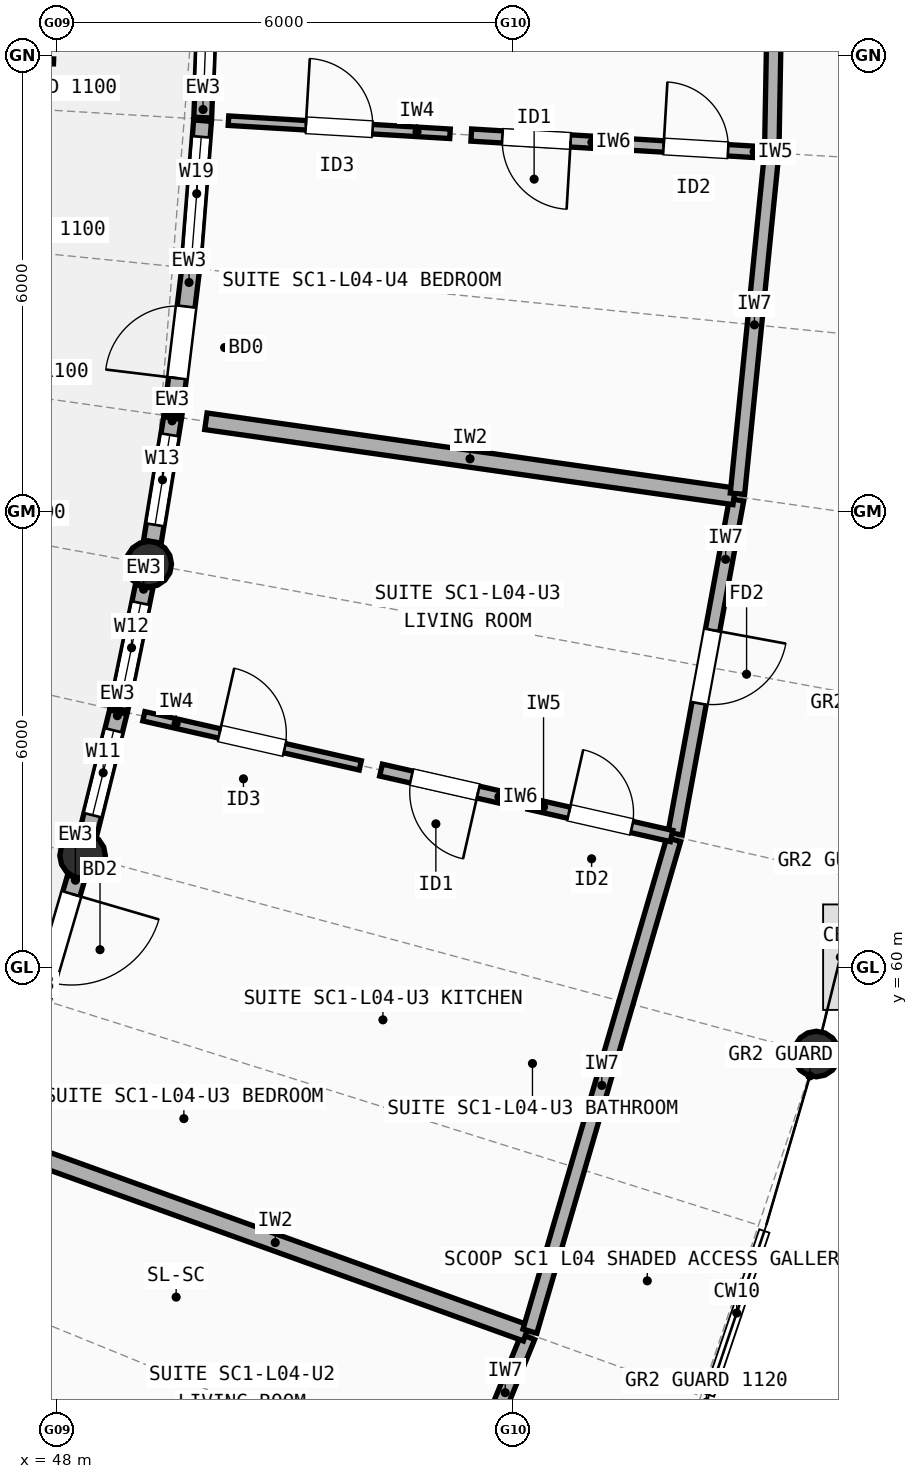
"""IFC4 building model, lengths in metres.
Left out: names, types, materials, properties, quantities, classifications, styles, units other than length and angle.
Written with IfcOpenShell. Run it as: python <this file> out.ifc"""

import sys

from ifc_helpers import new_model, si_unit, direction, frame, frame_2d, origin, origin_2d, place, context, subcontext, project, spatial, rectangle, circle, extrude, element, fill, save


model = new_model("IFC4")
c1 = context("Model", 3, precision=1e-05, world=origin(), true_north=direction((0.0, 1.0)))
c2 = subcontext(c1, "Body", "Model", "MODEL_VIEW")
j1 = project(units=[si_unit("LENGTHUNIT", "METRE"), si_unit("PLANEANGLEUNIT", "RADIAN")], contexts=[c1])
p1 = place(None, origin())
s1 = spatial("IfcSite", under=j1, at=p1, CompositionType="ELEMENT")
p2 = place(p1, origin())
s2 = spatial("IfcBuilding", under=s1, at=p2, CompositionType="ELEMENT")
p3 = place(p2, frame((0.0, 0.0, 14.1)))
s3 = spatial("IfcBuildingStorey", under=s2, at=p3, CompositionType="ELEMENT", Elevation=14.1)
for number, where, z_axis, x_axis in (
    (1, (48.336, 61.471, 0.0), (0.0, 0.0, 1.0), (1.0, 0.0, 0.0)),
    (2, (57.99, 58.861, 0.0), (0.0, 0.0, 1.0), (1.0, 0.0, 0.0)),
    (3, (49.206, 65.306, 0.0), (0.0, 0.0, 1.0), (1.0, 0.0, 0.0)),
):
    element("IfcColumn", number, at=place(p3, frame(where, z_axis=z_axis, x_axis=x_axis)), inside=s3, PredefinedType="COLUMN", context=c2, shape_type="SweptSolid", body=[
        extrude(circle(Radius=0.3, at=origin_2d()), origin(), (0.0, 0.0, 1.0), 2.948),
    ])
p4 = place(p3, frame((47.79, 59.603, 0.0), z_axis=(0.0, 0.0, 1.0), x_axis=(0.280648942253, 0.959810487134, 0.0)))
e4 = element("IfcWall", 4, at=p4, inside=s3, PredefinedType="STANDARD", context=c2, shape_type="SweptSolid", body=[
    extrude(rectangle(XDim=1.647, YDim=0.235, at=frame_2d((0.823, 0.0))), origin(), (0.0, 0.0, 1.0), 2.684),
])
p5 = place(p4, frame((0.223, 0.0, 0.0)))
e5 = element("IfcOpeningElement", 5, at=p5, cuts=e4, PredefinedType="OPENING", context=c2, shape_type="SweptSolid", body=[
    extrude(rectangle(XDim=1.2, YDim=2.15, at=frame_2d((0.6, 1.075))), frame((0.0, 0.127, 0.0), z_axis=(0.0, -1.0, 0.0), x_axis=(1.0, 0.0, 0.0)), (0.0, 0.0, 1.0), 0.255),
])
p6 = place(p3, frame((48.408, 61.762, 0.0), z_axis=(0.0, 0.0, 1.0), x_axis=(0.241175130643, 0.970481610521, 0.0)))
e6 = element("IfcWall", 6, at=p6, inside=s3, PredefinedType="STANDARD", context=c2, shape_type="SweptSolid", body=[
    extrude(rectangle(XDim=1.647, YDim=0.235, at=frame_2d((0.823, 0.0))), origin(), (0.0, 0.0, 1.0), 2.684),
])
p7 = place(p6, frame((0.248, 0.0, 0.85)))
e7 = element("IfcOpeningElement", 7, at=p7, cuts=e6, PredefinedType="OPENING", context=c2, shape_type="SweptSolid", body=[
    extrude(rectangle(XDim=1.15, YDim=1.45, at=frame_2d((0.575, 0.725))), frame((0.0, 0.127, 0.0), z_axis=(0.0, -1.0, 0.0), x_axis=(1.0, 0.0, 0.0)), (0.0, 0.0, 1.0), 0.255),
])
p8 = place(p3, frame((48.814, 63.399, 0.0), z_axis=(0.0, 0.0, 1.0), x_axis=(0.201188555682, 0.97955253308, 0.0)))
e8 = element("IfcWall", 8, at=p8, inside=s3, PredefinedType="STANDARD", context=c2, shape_type="SweptSolid", body=[
    extrude(rectangle(XDim=1.647, YDim=0.235, at=frame_2d((0.823, 0.0))), origin(), (0.0, 0.0, 1.0), 2.684),
])
p9 = place(p8, frame((0.223, 0.0, 0.85)))
e9 = element("IfcOpeningElement", 9, at=p9, cuts=e8, PredefinedType="OPENING", context=c2, shape_type="SweptSolid", body=[
    extrude(rectangle(XDim=1.2, YDim=1.35, at=frame_2d((0.6, 0.675))), frame((0.0, 0.127, 0.0), z_axis=(0.0, -1.0, 0.0), x_axis=(1.0, 0.0, 0.0)), (0.0, 0.0, 1.0), 0.255),
])
p10 = place(p3, frame((49.254, 65.603, 0.0), z_axis=(0.0, 0.0, 1.0), x_axis=(0.161008118798, 0.986953081803, 0.0)))
e10 = element("IfcWall", 10, at=p10, inside=s3, PredefinedType="STANDARD", context=c2, shape_type="SweptSolid", body=[
    extrude(rectangle(XDim=1.647, YDim=0.235, at=frame_2d((0.823, 0.0))), origin(), (0.0, 0.0, 1.0), 2.684),
])
p11 = place(p10, frame((0.223, 0.0, 0.85)))
e11 = element("IfcOpeningElement", 11, at=p11, cuts=e10, PredefinedType="OPENING", context=c2, shape_type="SweptSolid", body=[
    extrude(rectangle(XDim=1.2, YDim=1.45, at=frame_2d((0.6, 0.725))), frame((0.0, 0.127, 0.0), z_axis=(0.0, -1.0, 0.0), x_axis=(1.0, 0.0, 0.0)), (0.0, 0.0, 1.0), 0.255),
])
p12 = place(p3, frame((49.525, 67.268, 0.0), z_axis=(0.0, 0.0, 1.0), x_axis=(0.120384349076, 0.992727358592, 0.0)))
e12 = element("IfcWall", 12, at=p12, inside=s3, PredefinedType="STANDARD", context=c2, shape_type="SweptSolid", body=[
    extrude(rectangle(XDim=1.927, YDim=0.235, at=frame_2d((0.963, 0.0))), origin(), (0.0, 0.0, 1.0), 2.684),
])
p13 = place(p12, frame((0.488, 0.0, 0.0)))
e13 = element("IfcOpeningElement", 13, at=p13, cuts=e12, PredefinedType="OPENING", context=c2, shape_type="SweptSolid", body=[
    extrude(rectangle(XDim=0.95, YDim=2.12, at=frame_2d((0.475, 1.06))), frame((0.0, 0.127, 0.0), z_axis=(0.0, -1.0, 0.0), x_axis=(1.0, 0.0, 0.0)), (0.0, 0.0, 1.0), 0.255),
])
p14 = place(p3, frame((49.761, 69.22, 0.0), z_axis=(0.0, 0.0, 1.0), x_axis=(0.079573991137, 0.996828962227, 0.0)))
e14 = element("IfcWall", 14, at=p14, inside=s3, PredefinedType="STANDARD", context=c2, shape_type="SweptSolid", body=[
    extrude(rectangle(XDim=1.927, YDim=0.235, at=frame_2d((0.963, 0.0))), origin(), (0.0, 0.0, 1.0), 2.948),
])
p15 = place(p14, frame((0.213, 0.0, 0.85)))
e15 = element("IfcOpeningElement", 15, at=p15, cuts=e14, PredefinedType="OPENING", context=c2, shape_type="SweptSolid", body=[
    extrude(rectangle(XDim=1.5, YDim=1.5, at=frame_2d((0.75, 0.75))), frame((0.0, 0.127, 0.0), z_axis=(0.0, -1.0, 0.0), x_axis=(1.0, 0.0, 0.0)), (0.0, 0.0, 1.0), 0.255),
])
p16 = place(p3, frame((49.917, 71.181, 0.0), z_axis=(0.0, 0.0, 1.0), x_axis=(0.038647240614, 0.999252916329, 0.0)))
e16 = element("IfcWall", 16, at=p16, inside=s3, PredefinedType="STANDARD", context=c2, shape_type="SweptSolid", body=[
    extrude(rectangle(XDim=1.927, YDim=0.235, at=frame_2d((0.963, 0.0))), origin(), (0.0, 0.0, 1.0), 2.684),
])
p17 = place(p16, frame((0.363, 0.0, 0.85)))
e17 = element("IfcOpeningElement", 17, at=p17, cuts=e16, PredefinedType="OPENING", context=c2, shape_type="SweptSolid", body=[
    extrude(rectangle(XDim=1.2, YDim=1.5, at=frame_2d((0.6, 0.75))), frame((0.0, 0.127, 0.0), z_axis=(0.0, -1.0, 0.0), x_axis=(1.0, 0.0, 0.0)), (0.0, 0.0, 1.0), 0.255),
])
p18 = place(p3, frame((52.509, 51.002, 0.0), z_axis=(0.0, 0.0, 1.0), x_axis=(0.377413192487, 0.926044967665, 0.0)))
e18 = element("IfcWall", 18, at=p18, inside=s3, PredefinedType="SOLIDWALL", context=c2, shape_type="SweptSolid", body=[
    extrude(rectangle(XDim=4.467, YDim=0.19, at=frame_2d((2.234, 0.0))), origin(), (0.0, 0.0, 1.0), 2.722),
])
p19 = place(p18, frame((1.734, 0.0, 0.0)))
e19 = element("IfcOpeningElement", 19, at=p19, cuts=e18, PredefinedType="OPENING", context=c2, shape_type="SweptSolid", body=[
    extrude(rectangle(XDim=1.0, YDim=2.15, at=frame_2d((0.5, 1.075))), frame((0.0, 0.105, 0.0), z_axis=(0.0, -1.0, 0.0), x_axis=(1.0, 0.0, 0.0)), (0.0, 0.0, 1.0), 0.21),
])
p20 = place(p3, frame((47.569, 57.571, 0.0), z_axis=(0.0, 0.0, 1.0), x_axis=(0.940728143869, -0.339161553441, 0.0)))
e20 = element("IfcWall", 20, at=p20, inside=s3, PredefinedType="SOLIDWALL", context=c2, shape_type="SweptSolid", body=[
    extrude(rectangle(XDim=7.02, YDim=0.22, at=frame_2d((3.51, 0.0))), origin(), (0.0, 0.0, 1.0), 2.742),
])
p21 = place(p3, frame((54.221, 55.215, 0.0), z_axis=(0.0, 0.0, 1.0), x_axis=(0.280749798049, 0.95978099111, 0.0)))
e21 = element("IfcWall", 21, at=p21, inside=s3, PredefinedType="SOLIDWALL", context=c2, shape_type="SweptSolid", body=[
    extrude(rectangle(XDim=6.739, YDim=0.19, at=frame_2d((3.369, 0.0))), origin(), (0.0, 0.0, 1.0), 2.722),
])
p22 = place(p3, frame((56.132, 61.76, 0.0), z_axis=(0.0, 0.0, 1.0), x_axis=(0.181159647639, 0.983453701029, 0.0)))
e22 = element("IfcWall", 22, at=p22, inside=s3, PredefinedType="SOLIDWALL", context=c2, shape_type="SweptSolid", body=[
    extrude(rectangle(XDim=4.468, YDim=0.19, at=frame_2d((2.234, 0.0))), origin(), (0.0, 0.0, 1.0), 2.762),
])
p23 = place(p22, frame((1.744, 0.0, 0.0)))
e23 = element("IfcOpeningElement", 23, at=p23, cuts=e22, PredefinedType="OPENING", context=c2, shape_type="SweptSolid", body=[
    extrude(rectangle(XDim=0.98, YDim=2.15, at=frame_2d((0.49, 1.075))), frame((0.0, 0.105, 0.0), z_axis=(0.0, -1.0, 0.0), x_axis=(1.0, 0.0, 0.0)), (0.0, 0.0, 1.0), 0.21),
])
p24 = place(p3, frame((49.142, 63.305, 0.0), z_axis=(0.0, 0.0, 1.0), x_axis=(0.975217386735, -0.221248838661, 0.0)))
e24 = element("IfcWall", 24, at=p24, inside=s3, PredefinedType="PARTITIONING", context=c2, shape_type="SweptSolid", body=[
    extrude(rectangle(XDim=2.92, YDim=0.125, at=frame_2d((1.46, 0.0))), origin(), (0.0, 0.0, 1.0), 2.742),
])
p25 = place(p24, frame((1.02, 0.0, 0.0)))
e25 = element("IfcOpeningElement", 25, at=p25, cuts=e24, PredefinedType="OPENING", context=c2, shape_type="SweptSolid", body=[
    extrude(rectangle(XDim=0.88, YDim=2.1, at=frame_2d((0.44, 1.05))), frame((0.0, 0.073, 0.0), z_axis=(0.0, -1.0, 0.0), x_axis=(1.0, 0.0, 0.0)), (0.0, 0.0, 1.0), 0.145),
])
p26 = place(p3, frame((52.263, 62.597, 0.0), z_axis=(0.0, 0.0, 1.0), x_axis=(0.97521226366, -0.221271418868, 0.0)))
e26 = element("IfcWall", 26, at=p26, inside=s3, PredefinedType="PLUMBINGWALL", context=c2, shape_type="SweptSolid", body=[
    extrude(rectangle(XDim=1.72, YDim=0.16, at=frame_2d((0.86, 0.0))), origin(), (0.0, 0.0, 1.0), 2.742),
])
p27 = place(p26, frame((0.41, 0.0, 0.0)))
e27 = element("IfcOpeningElement", 27, at=p27, cuts=e26, PredefinedType="OPENING", context=c2, shape_type="SweptSolid", body=[
    extrude(rectangle(XDim=0.9, YDim=2.1, at=frame_2d((0.45, 1.05))), frame((0.0, 0.09, 0.0), z_axis=(0.0, -1.0, 0.0), x_axis=(1.0, 0.0, 0.0)), (0.0, 0.0, 1.0), 0.18),
])
p28 = place(p3, frame((54.213, 62.154, 0.0), z_axis=(0.0, 0.0, 1.0), x_axis=(0.975241417354, -0.221142890179, 0.0)))
e28 = element("IfcWall", 28, at=p28, inside=s3, PredefinedType="PARTITIONING", context=c2, shape_type="SweptSolid", body=[
    extrude(rectangle(XDim=1.92, YDim=0.15, at=frame_2d((0.96, 0.0))), origin(), (0.0, 0.0, 1.0), 2.742),
])
p29 = place(p28, frame((0.535, 0.0, 0.0)))
e29 = element("IfcOpeningElement", 29, at=p29, cuts=e28, PredefinedType="OPENING", context=c2, shape_type="SweptSolid", body=[
    extrude(rectangle(XDim=0.85, YDim=2.1, at=frame_2d((0.425, 1.05))), frame((0.0, 0.085, 0.0), z_axis=(0.0, -1.0, 0.0), x_axis=(1.0, 0.0, 0.0)), (0.0, 0.0, 1.0), 0.17),
])
p30 = place(p3, frame((49.958, 67.186, 0.0), z_axis=(0.0, 0.0, 1.0), x_axis=(0.990050789243, -0.140710464145, 0.0)))
e30 = element("IfcWall", 30, at=p30, inside=s3, PredefinedType="SOLIDWALL", context=c2, shape_type="SweptSolid", body=[
    extrude(rectangle(XDim=7.02, YDim=0.22, at=frame_2d((3.51, 0.0))), origin(), (0.0, 0.0, 1.0), 2.722),
])
p31 = place(p3, frame((56.952, 66.232, 0.0), z_axis=(0.0, 0.0, 1.0), x_axis=(0.099963674738, 0.994991087263, 0.0)))
e31 = element("IfcWall", 31, at=p31, inside=s3, PredefinedType="SOLIDWALL", context=c2, shape_type="SweptSolid", body=[
    extrude(rectangle(XDim=4.467, YDim=0.19, at=frame_2d((2.233, 0.0))), origin(), (0.0, 0.0, 1.0), 2.742),
])
p32 = place(p3, frame((57.404, 70.757, 0.0), z_axis=(0.0, 0.0, 1.0), x_axis=(0.018198680075, 0.999834390308, 0.0)))
e32 = element("IfcWall", 32, at=p32, inside=s3, PredefinedType="SOLIDWALL", context=c2, shape_type="SweptSolid", body=[
    extrude(rectangle(XDim=4.467, YDim=0.19, at=frame_2d((2.234, 0.0))), origin(), (0.0, 0.0, 1.0), 2.722),
])
p33 = place(p32, frame((1.708, 0.0, 0.0)))
e33 = element("IfcOpeningElement", 33, at=p33, cuts=e32, PredefinedType="OPENING", context=c2, shape_type="SweptSolid", body=[
    extrude(rectangle(XDim=1.05, YDim=2.15, at=frame_2d((0.525, 1.075))), frame((0.0, 0.105, 0.0), z_axis=(0.0, -1.0, 0.0), x_axis=(1.0, 0.0, 0.0)), (0.0, 0.0, 1.0), 0.21),
])
p34 = place(p3, frame((50.255, 71.14, 0.0), z_axis=(0.0, 0.0, 1.0), x_axis=(0.998251230611, -0.05911413184, 0.0)))
e34 = element("IfcWall", 34, at=p34, inside=s3, PredefinedType="PARTITIONING", context=c2, shape_type="SweptSolid", body=[
    extrude(rectangle(XDim=2.92, YDim=0.125, at=frame_2d((1.46, 0.0))), origin(), (0.0, 0.0, 1.0), 2.762),
])
p35 = place(p34, frame((1.02, 0.0, 0.0)))
e35 = element("IfcOpeningElement", 35, at=p35, cuts=e34, PredefinedType="OPENING", context=c2, shape_type="SweptSolid", body=[
    extrude(rectangle(XDim=0.88, YDim=2.1, at=frame_2d((0.44, 1.05))), frame((0.0, 0.073, 0.0), z_axis=(0.0, -1.0, 0.0), x_axis=(1.0, 0.0, 0.0)), (0.0, 0.0, 1.0), 0.145),
])
p36 = place(p3, frame((53.45, 70.951, 0.0), z_axis=(0.0, 0.0, 1.0), x_axis=(0.998255232119, -0.059046520199, 0.0)))
e36 = element("IfcWall", 36, at=p36, inside=s3, PredefinedType="PLUMBINGWALL", context=c2, shape_type="SweptSolid", body=[
    extrude(rectangle(XDim=1.72, YDim=0.16, at=frame_2d((0.86, 0.0))), origin(), (0.0, 0.0, 1.0), 2.762),
])
p37 = place(p36, frame((0.41, 0.0, 0.0)))
e37 = element("IfcOpeningElement", 37, at=p37, cuts=e36, PredefinedType="OPENING", context=c2, shape_type="SweptSolid", body=[
    extrude(rectangle(XDim=0.9, YDim=2.1, at=frame_2d((0.45, 1.05))), frame((0.0, 0.09, 0.0), z_axis=(0.0, -1.0, 0.0), x_axis=(1.0, 0.0, 0.0)), (0.0, 0.0, 1.0), 0.18),
])
p38 = place(p3, frame((55.446, 70.833, 0.0), z_axis=(0.0, 0.0, 1.0), x_axis=(0.998250171361, -0.05913201652, 0.0)))
e38 = element("IfcWall", 38, at=p38, inside=s3, PredefinedType="PARTITIONING", context=c2, shape_type="SweptSolid", body=[
    extrude(rectangle(XDim=1.92, YDim=0.15, at=frame_2d((0.96, 0.0))), origin(), (0.0, 0.0, 1.0), 2.762),
])
p39 = place(p38, frame((0.535, 0.0, 0.0)))
e39 = element("IfcOpeningElement", 39, at=p39, cuts=e38, PredefinedType="OPENING", context=c2, shape_type="SweptSolid", body=[
    extrude(rectangle(XDim=0.85, YDim=2.1, at=frame_2d((0.425, 1.05))), frame((0.0, 0.085, 0.0), z_axis=(0.0, -1.0, 0.0), x_axis=(1.0, 0.0, 0.0)), (0.0, 0.0, 1.0), 0.17),
])
p40 = place(p5, origin())
e40 = element("IfcDoor", 40, at=p40, inside=s3, OperationType="SINGLE_SWING_RIGHT", PredefinedType="DOOR", context=c2, shape_type="SweptSolid", body=[
    extrude(rectangle(XDim=1.2, YDim=2.15, at=frame_2d((0.6, 1.075))), frame((0.0, 0.025, 0.0), z_axis=(0.0, -1.0, 0.0), x_axis=(1.0, 0.0, 0.0)), (0.0, 0.0, 1.0), 0.05),
])
fill(e5, e40)
p41 = place(p7, origin())
e41 = element("IfcWindow", 41, at=p41, inside=s3, PartitioningType="SINGLE_PANEL", PredefinedType="WINDOW", context=c2, shape_type="SweptSolid", body=[
    extrude(rectangle(XDim=1.15, YDim=1.45, at=frame_2d((0.575, 0.725))), frame((0.0, 0.03, 0.0), z_axis=(0.0, -1.0, 0.0), x_axis=(1.0, 0.0, 0.0)), (0.0, 0.0, 1.0), 0.06),
])
fill(e7, e41)
p42 = place(p9, origin())
e42 = element("IfcWindow", 42, at=p42, inside=s3, PartitioningType="SINGLE_PANEL", PredefinedType="WINDOW", context=c2, shape_type="SweptSolid", body=[
    extrude(rectangle(XDim=1.2, YDim=1.35, at=frame_2d((0.6, 0.675))), frame((0.0, 0.03, 0.0), z_axis=(0.0, -1.0, 0.0), x_axis=(1.0, 0.0, 0.0)), (0.0, 0.0, 1.0), 0.06),
])
fill(e9, e42)
p43 = place(p11, origin())
e43 = element("IfcWindow", 43, at=p43, inside=s3, PartitioningType="SINGLE_PANEL", PredefinedType="WINDOW", context=c2, shape_type="SweptSolid", body=[
    extrude(rectangle(XDim=1.2, YDim=1.45, at=frame_2d((0.6, 0.725))), frame((0.0, 0.03, 0.0), z_axis=(0.0, -1.0, 0.0), x_axis=(1.0, 0.0, 0.0)), (0.0, 0.0, 1.0), 0.06),
])
fill(e11, e43)
p44 = place(p13, origin())
e44 = element("IfcDoor", 44, at=p44, inside=s3, OperationType="SINGLE_SWING_LEFT", PredefinedType="DOOR", context=c2, shape_type="SweptSolid", body=[
    extrude(rectangle(XDim=0.95, YDim=2.12, at=frame_2d((0.475, 1.06))), frame((0.0, 0.025, 0.0), z_axis=(0.0, -1.0, 0.0), x_axis=(1.0, 0.0, 0.0)), (0.0, 0.0, 1.0), 0.05),
])
fill(e13, e44)
p45 = place(p15, origin())
e45 = element("IfcWindow", 45, at=p45, inside=s3, PartitioningType="SINGLE_PANEL", PredefinedType="WINDOW", context=c2, shape_type="SweptSolid", body=[
    extrude(rectangle(XDim=1.5, YDim=1.5, at=frame_2d((0.75, 0.75))), frame((0.0, 0.03, 0.0), z_axis=(0.0, -1.0, 0.0), x_axis=(1.0, 0.0, 0.0)), (0.0, 0.0, 1.0), 0.06),
])
fill(e15, e45)
p46 = place(p17, origin())
e46 = element("IfcWindow", 46, at=p46, inside=s3, PartitioningType="SINGLE_PANEL", PredefinedType="WINDOW", context=c2, shape_type="SweptSolid", body=[
    extrude(rectangle(XDim=1.2, YDim=1.5, at=frame_2d((0.6, 0.75))), frame((0.0, 0.03, 0.0), z_axis=(0.0, -1.0, 0.0), x_axis=(1.0, 0.0, 0.0)), (0.0, 0.0, 1.0), 0.06),
])
fill(e17, e46)
p47 = place(p23, origin())
e47 = element("IfcDoor", 47, at=p47, inside=s3, OperationType="SINGLE_SWING_RIGHT", PredefinedType="DOOR", context=c2, shape_type="SweptSolid", body=[
    extrude(rectangle(XDim=0.98, YDim=2.15, at=frame_2d((0.49, 1.075))), frame((0.0, 0.025, 0.0), z_axis=(0.0, -1.0, 0.0), x_axis=(1.0, 0.0, 0.0)), (0.0, 0.0, 1.0), 0.05),
])
fill(e23, e47)
p48 = place(p25, origin())
e48 = element("IfcDoor", 48, at=p48, inside=s3, OperationType="SINGLE_SWING_LEFT", PredefinedType="DOOR", context=c2, shape_type="SweptSolid", body=[
    extrude(rectangle(XDim=0.88, YDim=2.1, at=frame_2d((0.44, 1.05))), frame((0.0, 0.025, 0.0), z_axis=(0.0, -1.0, 0.0), x_axis=(1.0, 0.0, 0.0)), (0.0, 0.0, 1.0), 0.05),
])
fill(e25, e48)
p49 = place(p27, origin())
e49 = element("IfcDoor", 49, at=p49, inside=s3, OperationType="SINGLE_SWING_RIGHT", PredefinedType="DOOR", context=c2, shape_type="SweptSolid", body=[
    extrude(rectangle(XDim=0.9, YDim=2.1, at=frame_2d((0.45, 1.05))), frame((0.0, 0.025, 0.0), z_axis=(0.0, -1.0, 0.0), x_axis=(1.0, 0.0, 0.0)), (0.0, 0.0, 1.0), 0.05),
])
fill(e27, e49)
p50 = place(p29, origin())
e50 = element("IfcDoor", 50, at=p50, inside=s3, OperationType="SINGLE_SWING_LEFT", PredefinedType="DOOR", context=c2, shape_type="SweptSolid", body=[
    extrude(rectangle(XDim=0.85, YDim=2.1, at=frame_2d((0.425, 1.05))), frame((0.0, 0.025, 0.0), z_axis=(0.0, -1.0, 0.0), x_axis=(1.0, 0.0, 0.0)), (0.0, 0.0, 1.0), 0.05),
])
fill(e29, e50)
p51 = place(p35, origin())
e51 = element("IfcDoor", 51, at=p51, inside=s3, OperationType="SINGLE_SWING_LEFT", PredefinedType="DOOR", context=c2, shape_type="SweptSolid", body=[
    extrude(rectangle(XDim=0.88, YDim=2.1, at=frame_2d((0.44, 1.05))), frame((0.0, 0.025, 0.0), z_axis=(0.0, -1.0, 0.0), x_axis=(1.0, 0.0, 0.0)), (0.0, 0.0, 1.0), 0.05),
])
fill(e35, e51)
p52 = place(p37, origin())
e52 = element("IfcDoor", 52, at=p52, inside=s3, OperationType="SINGLE_SWING_RIGHT", PredefinedType="DOOR", context=c2, shape_type="SweptSolid", body=[
    extrude(rectangle(XDim=0.9, YDim=2.1, at=frame_2d((0.45, 1.05))), frame((0.0, 0.025, 0.0), z_axis=(0.0, -1.0, 0.0), x_axis=(1.0, 0.0, 0.0)), (0.0, 0.0, 1.0), 0.05),
])
fill(e37, e52)
p53 = place(p39, origin())
e53 = element("IfcDoor", 53, at=p53, inside=s3, OperationType="SINGLE_SWING_LEFT", PredefinedType="DOOR", context=c2, shape_type="SweptSolid", body=[
    extrude(rectangle(XDim=0.85, YDim=2.1, at=frame_2d((0.425, 1.05))), frame((0.0, 0.025, 0.0), z_axis=(0.0, -1.0, 0.0), x_axis=(1.0, 0.0, 0.0)), (0.0, 0.0, 1.0), 0.05),
])
fill(e39, e53)
save(model, sys.argv[1])
